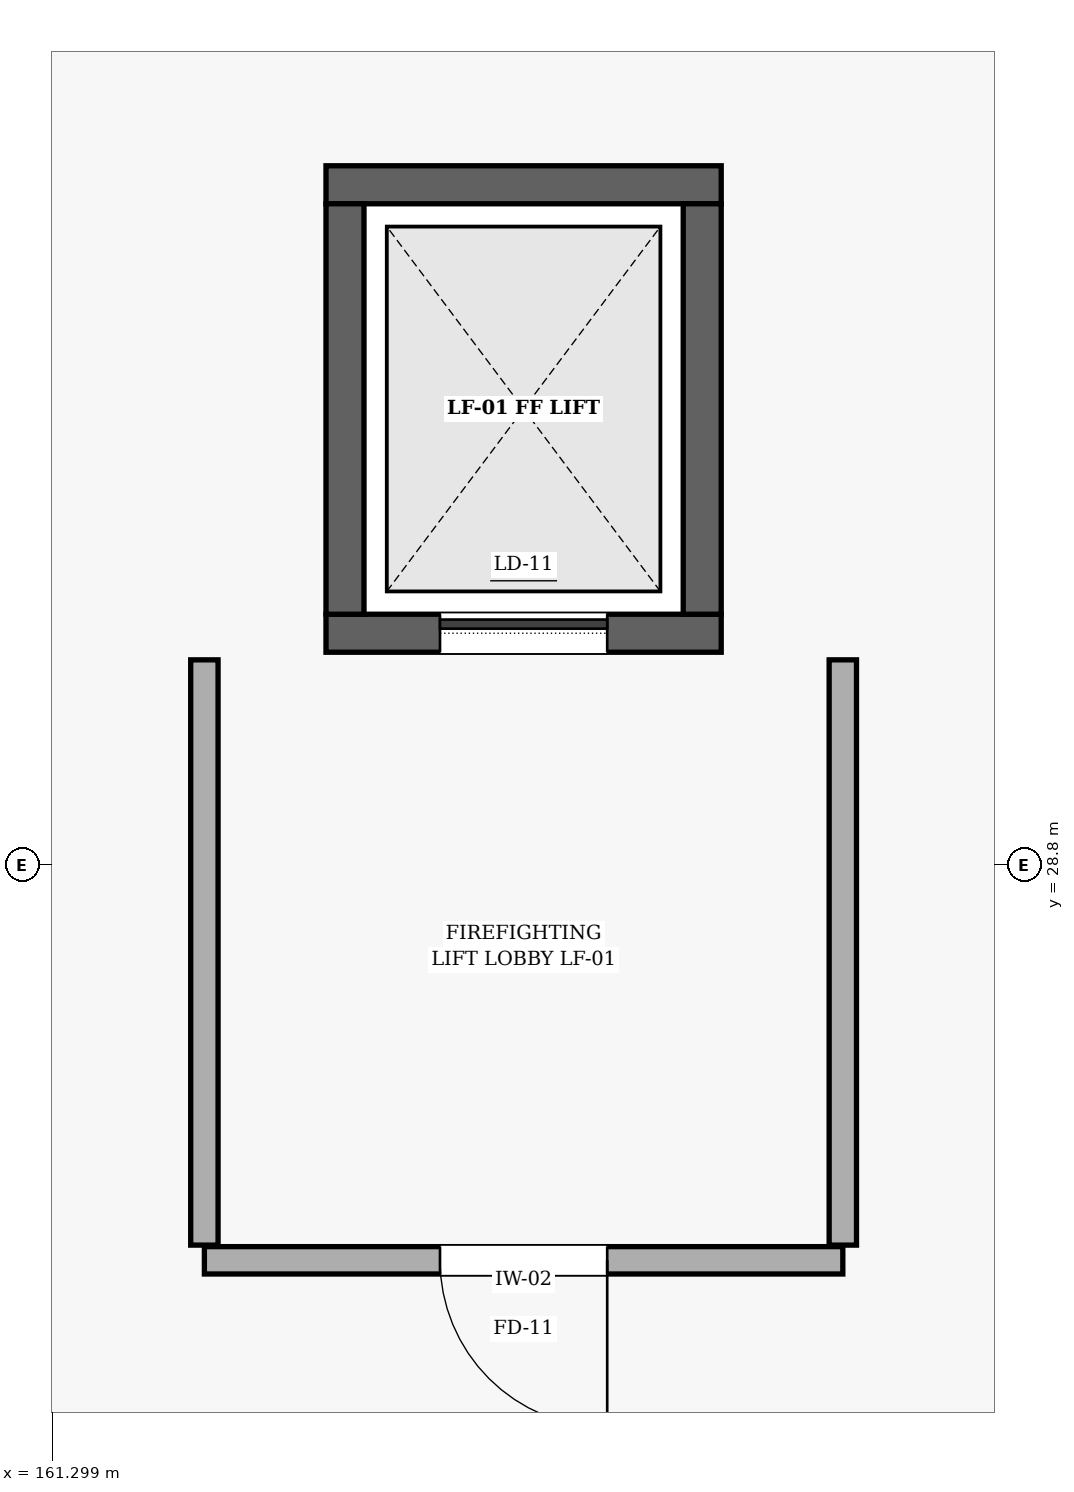
"""IFC4 building model, lengths in metres.
Left out: names, types, materials, properties, quantities, classifications, styles, units other than length and angle.
Written with IfcOpenShell. Run it as: python <this file> out.ifc"""

import sys

from ifc_helpers import new_model, si_unit, direction, frame, frame_2d, origin, place, context, subcontext, project, spatial, rectangle, extrude, element, fill, save


model = new_model("IFC4")
c1 = context("Model", 3, precision=1e-05, world=origin(), true_north=direction((0.0, 1.0)))
c2 = subcontext(c1, "Body", "Model", "MODEL_VIEW")
j1 = project(units=[si_unit("LENGTHUNIT", "METRE"), si_unit("PLANEANGLEUNIT", "RADIAN")], contexts=[c1])
p1 = place(None, origin())
s1 = spatial("IfcSite", under=j1, at=p1, CompositionType="ELEMENT")
p2 = place(p1, origin())
s2 = spatial("IfcBuilding", under=s1, at=p2, CompositionType="ELEMENT")
p3 = place(p2, origin())
s3 = spatial("IfcBuildingStorey", under=s2, at=p3, CompositionType="ELEMENT", Elevation=0.0)
p4 = place(p3, frame((163.1, 30.325, 0.0), z_axis=(0.0, 0.0, 1.0), x_axis=(1.0, 0.0, 0.0)))
e1 = element("IfcWall", 1, at=p4, inside=s3, PredefinedType="SHEAR", context=c2, shape_type="SweptSolid", body=[
    extrude(rectangle(XDim=2.6, YDim=0.25, at=frame_2d((1.3, 0.0))), origin(), (0.0, 0.0, 1.0), 5.12),
])
p5 = place(p4, frame((0.75, 0.0, 0.0)))
e2 = element("IfcOpeningElement", 2, at=p5, cuts=e1, PredefinedType="OPENING", context=c2, shape_type="SweptSolid", body=[
    extrude(rectangle(XDim=1.1, YDim=2.15, at=frame_2d((0.55, 1.075))), frame((0.0, 0.135, 0.0), z_axis=(0.0, -1.0, 0.0), x_axis=(1.0, 0.0, 0.0)), (0.0, 0.0, 1.0), 0.27),
])
p6 = place(p3, frame((163.1, 33.275, 0.0), z_axis=(0.0, 0.0, 1.0), x_axis=(1.0, 0.0, 0.0)))
e3 = element("IfcWall", 3, at=p6, inside=s3, PredefinedType="SHEAR", context=c2, shape_type="SweptSolid", body=[
    extrude(rectangle(XDim=2.6, YDim=0.25, at=frame_2d((1.3, 0.0))), origin(), (0.0, 0.0, 1.0), 5.12),
])
for number, where, z_axis, x_axis in (
    (4, (163.225, 30.45, 0.0), (0.0, 0.0, 1.0), (0.0, 1.0, 0.0)),
    (5, (165.575, 30.45, 0.0), (0.0, 0.0, 1.0), (0.0, 1.0, 0.0)),
):
    element("IfcWall", number, at=place(p3, frame(where, z_axis=z_axis, x_axis=x_axis)), inside=s3, PredefinedType="SHEAR", context=c2, shape_type="SweptSolid", body=[
        extrude(rectangle(XDim=2.7, YDim=0.25, at=frame_2d((1.35, 0.0))), origin(), (0.0, 0.0, 1.0), 5.12),
    ])
p7 = place(p3, frame((166.5, 26.2, 0.0), z_axis=(0.0, 0.0, 1.0), x_axis=(-1.0, 0.0, 0.0)))
e6 = element("IfcWall", 6, at=p7, inside=s3, PredefinedType="PARTITIONING", context=c2, shape_type="SweptSolid", body=[
    extrude(rectangle(XDim=4.2, YDim=0.18, at=frame_2d((2.1, 0.0))), origin(), (0.0, 0.0, 1.0), 4.605),
])
p8 = place(p7, frame((1.55, 0.0, 0.0)))
e7 = element("IfcOpeningElement", 7, at=p8, cuts=e6, PredefinedType="OPENING", context=c2, shape_type="SweptSolid", body=[
    extrude(rectangle(XDim=1.1, YDim=2.15, at=frame_2d((0.55, 1.075))), frame((0.0, 0.1, 0.0), z_axis=(0.0, -1.0, 0.0), x_axis=(1.0, 0.0, 0.0)), (0.0, 0.0, 1.0), 0.2),
])
for number, where, z_axis, x_axis in (
    (8, (162.3, 26.3, 0.0), (0.0, 0.0, 1.0), (0.0, 1.0, 0.0)),
    (9, (166.5, 26.3, 0.0), (0.0, 0.0, 1.0), (0.0, 1.0, 0.0)),
):
    element("IfcWall", number, at=place(p3, frame(where, z_axis=z_axis, x_axis=x_axis)), inside=s3, PredefinedType="PARTITIONING", context=c2, shape_type="SweptSolid", body=[
        extrude(rectangle(XDim=3.85, YDim=0.18, at=frame_2d((1.925, 0.0))), origin(), (0.0, 0.0, 1.0), 4.205),
    ])
p9 = place(p5, origin())
e10 = element("IfcDoor", 10, at=p9, inside=s3, OperationType="SLIDING_TO_LEFT", PredefinedType="DOOR", context=c2, shape_type="SweptSolid", body=[
    extrude(rectangle(XDim=1.1, YDim=2.15, at=frame_2d((0.55, 1.075))), frame((0.0, 0.025, 0.0), z_axis=(0.0, -1.0, 0.0), x_axis=(1.0, 0.0, 0.0)), (0.0, 0.0, 1.0), 0.05),
])
fill(e2, e10)
p10 = place(p8, origin())
e11 = element("IfcDoor", 11, at=p10, inside=s3, OperationType="SINGLE_SWING_LEFT", PredefinedType="DOOR", context=c2, shape_type="SweptSolid", body=[
    extrude(rectangle(XDim=1.1, YDim=2.15, at=frame_2d((0.55, 1.075))), frame((0.0, 0.025, 0.0), z_axis=(0.0, -1.0, 0.0), x_axis=(1.0, 0.0, 0.0)), (0.0, 0.0, 1.0), 0.05),
])
fill(e7, e11)
save(model, sys.argv[1])
